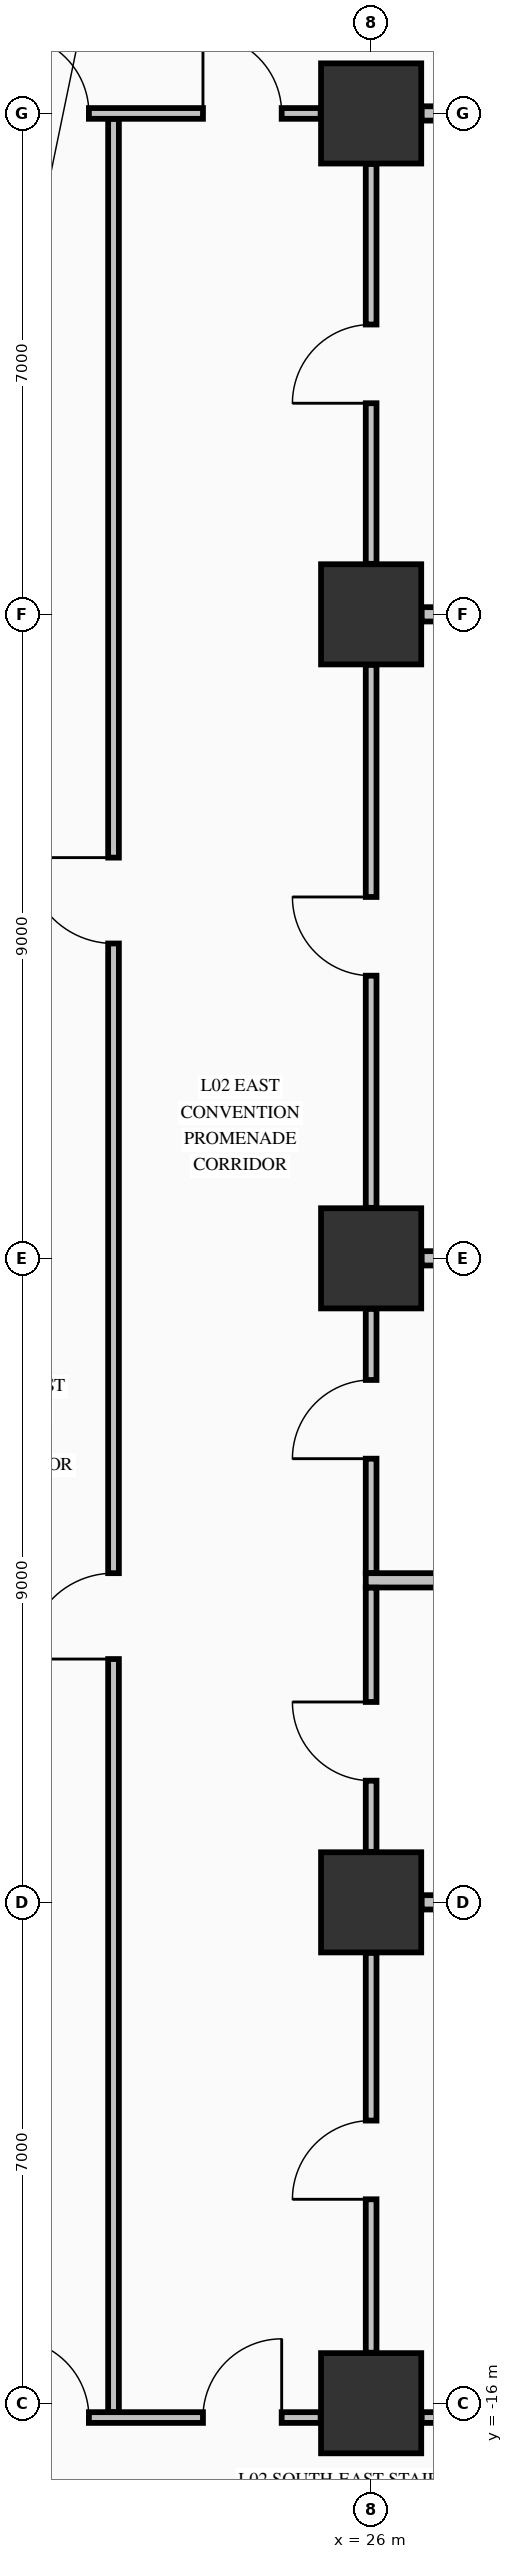
"""IFC4 building model, lengths in metres.
Left out: names, types, materials, properties, quantities, classifications, styles, units other than length and angle.
Written with IfcOpenShell. Run it as: python <this file> out.ifc"""

import sys

from ifc_helpers import new_model, si_unit, direction, frame, frame_2d, origin, origin_2d, place, context, subcontext, project, spatial, rectangle, extrude, element, fill, save


model = new_model("IFC4")
c1 = context("Model", 3, precision=1e-05, world=origin(), true_north=direction((0.0, 1.0)))
c2 = subcontext(c1, "Body", "Model", "MODEL_VIEW")
j1 = project(units=[si_unit("LENGTHUNIT", "METRE"), si_unit("PLANEANGLEUNIT", "RADIAN")], contexts=[c1])
p1 = place(None, origin())
s1 = spatial("IfcSite", under=j1, at=p1, CompositionType="ELEMENT")
p2 = place(p1, origin())
s2 = spatial("IfcBuilding", under=s1, at=p2, CompositionType="ELEMENT")
p3 = place(p2, frame((0.0, 0.0, 10.88)))
s3 = spatial("IfcBuildingStorey", under=s2, at=p3, CompositionType="ELEMENT", Elevation=10.88)
for number, where, z_axis, x_axis in (
    (1, (26.0, -16.0, 0.0), (0.0, 0.0, 1.0), (1.0, 0.0, 0.0)),
    (2, (26.0, -9.0, 0.0), (0.0, 0.0, 1.0), (1.0, 0.0, 0.0)),
    (3, (26.0, 0.0, 0.0), (0.0, 0.0, 1.0), (1.0, 0.0, 0.0)),
    (4, (26.0, 9.0, 0.0), (0.0, 0.0, 1.0), (1.0, 0.0, 0.0)),
    (5, (26.0, 16.0, 0.0), (0.0, 0.0, 1.0), (1.0, 0.0, 0.0)),
):
    element("IfcColumn", number, at=place(p3, frame(where, z_axis=z_axis, x_axis=x_axis)), inside=s3, PredefinedType="COLUMN", context=c2, shape_type="SweptSolid", body=[
        extrude(rectangle(XDim=1.4, YDim=1.4, at=origin_2d()), origin(), (0.0, 0.0, 1.0), 5.09),
    ])
p4 = place(p3, frame((20.806, -16.2, 0.0), z_axis=(0.0, 0.0, 1.0), x_axis=(1.0, 0.0, 0.0)))
e6 = element("IfcWall", 6, at=p4, inside=s3, PredefinedType="PARTITIONING", context=c2, shape_type="SweptSolid", body=[
    extrude(rectangle(XDim=4.488, YDim=0.15, at=frame_2d((2.244, 0.0))), origin(), (0.0, 0.0, 1.0), 4.132),
])
p5 = place(p4, frame((0.15, 0.0, 0.0)))
e7 = element("IfcOpeningElement", 7, at=p5, cuts=e6, PredefinedType="OPENING", context=c2, shape_type="SweptSolid", body=[
    extrude(rectangle(XDim=1.1, YDim=2.15, at=frame_2d((0.55, 1.075))), frame((0.0, 0.085, 0.0), z_axis=(0.0, -1.0, 0.0), x_axis=(1.0, 0.0, 0.0)), (0.0, 0.0, 1.0), 0.17),
])
p6 = place(p4, frame((2.844, 0.0, 0.0)))
e8 = element("IfcOpeningElement", 8, at=p6, cuts=e6, PredefinedType="OPENING", context=c2, shape_type="SweptSolid", body=[
    extrude(rectangle(XDim=1.1, YDim=2.15, at=frame_2d((0.55, 1.075))), frame((0.0, 0.085, 0.0), z_axis=(0.0, -1.0, 0.0), x_axis=(1.0, 0.0, 0.0)), (0.0, 0.0, 1.0), 0.17),
])
p7 = place(p3, frame((26.706, -16.2, 0.0), z_axis=(0.0, 0.0, 1.0), x_axis=(1.0, 0.0, 0.0)))
e9 = element("IfcWall", 9, at=p7, inside=s3, PredefinedType="PARTITIONING", context=c2, shape_type="SweptSolid", body=[
    extrude(rectangle(XDim=2.588, YDim=0.15, at=frame_2d((1.294, 0.0))), origin(), (0.0, 0.0, 1.0), 4.132),
])
p8 = place(p3, frame((26.706, -9.0, 0.0), z_axis=(0.0, 0.0, 1.0), x_axis=(1.0, 0.0, 0.0)))
e10 = element("IfcWall", 10, at=p8, inside=s3, PredefinedType="PARTITIONING", context=c2, shape_type="SweptSolid", body=[
    extrude(rectangle(XDim=2.588, YDim=0.2, at=frame_2d((1.294, 0.0))), origin(), (0.0, 0.0, 1.0), 4.132),
])
p9 = place(p3, frame((25.925, -4.5, 0.0), z_axis=(0.0, 0.0, 1.0), x_axis=(1.0, 0.0, 0.0)))
e11 = element("IfcWall", 11, at=p9, inside=s3, PredefinedType="PARTITIONING", context=c2, shape_type="SweptSolid", body=[
    extrude(rectangle(XDim=7.91, YDim=0.2, at=frame_2d((3.955, 0.0))), origin(), (0.0, 0.0, 1.0), 4.48),
])
for number, where, z_axis, x_axis in (
    (12, (26.706, 0.0, 0.0), (0.0, 0.0, 1.0), (1.0, 0.0, 0.0)),
    (13, (26.706, 9.0, 0.0), (0.0, 0.0, 1.0), (1.0, 0.0, 0.0)),
):
    element("IfcWall", number, at=place(p3, frame(where, z_axis=z_axis, x_axis=x_axis)), inside=s3, PredefinedType="PARTITIONING", context=c2, shape_type="SweptSolid", body=[
        extrude(rectangle(XDim=2.588, YDim=0.2, at=frame_2d((1.294, 0.0))), origin(), (0.0, 0.0, 1.0), 4.132),
    ])
p10 = place(p3, frame((20.806, 16.0, 0.0), z_axis=(0.0, 0.0, 1.0), x_axis=(1.0, 0.0, 0.0)))
e14 = element("IfcWall", 14, at=p10, inside=s3, PredefinedType="PARTITIONING", context=c2, shape_type="SweptSolid", body=[
    extrude(rectangle(XDim=4.488, YDim=0.15, at=frame_2d((2.244, 0.0))), origin(), (0.0, 0.0, 1.0), 4.132),
])
p11 = place(p10, frame((0.15, 0.0, 0.0)))
e15 = element("IfcOpeningElement", 15, at=p11, cuts=e14, PredefinedType="OPENING", context=c2, shape_type="SweptSolid", body=[
    extrude(rectangle(XDim=1.1, YDim=2.15, at=frame_2d((0.55, 1.075))), frame((0.0, 0.085, 0.0), z_axis=(0.0, -1.0, 0.0), x_axis=(1.0, 0.0, 0.0)), (0.0, 0.0, 1.0), 0.17),
])
p12 = place(p10, frame((2.844, 0.0, 0.0)))
e16 = element("IfcOpeningElement", 16, at=p12, cuts=e14, PredefinedType="OPENING", context=c2, shape_type="SweptSolid", body=[
    extrude(rectangle(XDim=1.1, YDim=2.15, at=frame_2d((0.55, 1.075))), frame((0.0, 0.085, 0.0), z_axis=(0.0, -1.0, 0.0), x_axis=(1.0, 0.0, 0.0)), (0.0, 0.0, 1.0), 0.17),
])
p13 = place(p3, frame((26.706, 16.0, 0.0), z_axis=(0.0, 0.0, 1.0), x_axis=(1.0, 0.0, 0.0)))
e17 = element("IfcWall", 17, at=p13, inside=s3, PredefinedType="PARTITIONING", context=c2, shape_type="SweptSolid", body=[
    extrude(rectangle(XDim=2.588, YDim=0.2, at=frame_2d((1.294, 0.0))), origin(), (0.0, 0.0, 1.0), 4.132),
])
p14 = place(p3, frame((22.4, -16.122, 0.0), z_axis=(0.0, 0.0, 1.0), x_axis=(0.0, 1.0, 0.0)))
e18 = element("IfcWall", 18, at=p14, inside=s3, PredefinedType="PARTITIONING", context=c2, shape_type="SweptSolid", body=[
    extrude(rectangle(XDim=32.044, YDim=0.15, at=frame_2d((16.022, 0.0))), origin(), (0.0, 0.0, 1.0), 5.09),
])
p15 = place(p14, frame((10.522, 0.0, 0.0)))
e19 = element("IfcOpeningElement", 19, at=p15, cuts=e18, PredefinedType="OPENING", context=c2, shape_type="SweptSolid", body=[
    extrude(rectangle(XDim=1.2, YDim=2.15, at=frame_2d((0.6, 1.075))), frame((0.0, 0.085, 0.0), z_axis=(0.0, -1.0, 0.0), x_axis=(1.0, 0.0, 0.0)), (0.0, 0.0, 1.0), 0.17),
])
p16 = place(p14, frame((20.522, 0.0, 0.0)))
e20 = element("IfcOpeningElement", 20, at=p16, cuts=e18, PredefinedType="OPENING", context=c2, shape_type="SweptSolid", body=[
    extrude(rectangle(XDim=1.2, YDim=2.15, at=frame_2d((0.6, 1.075))), frame((0.0, 0.085, 0.0), z_axis=(0.0, -1.0, 0.0), x_axis=(1.0, 0.0, 0.0)), (0.0, 0.0, 1.0), 0.17),
])
p17 = place(p3, frame((26.0, -15.294, 0.0), z_axis=(0.0, 0.0, 1.0), x_axis=(0.0, 1.0, 0.0)))
e21 = element("IfcWall", 21, at=p17, inside=s3, PredefinedType="PARTITIONING", context=c2, shape_type="SweptSolid", body=[
    extrude(rectangle(XDim=5.588, YDim=0.15, at=frame_2d((2.794, 0.0))), origin(), (0.0, 0.0, 1.0), 4.132),
])
p18 = place(p17, frame((2.144, 0.0, 0.0)))
e22 = element("IfcOpeningElement", 22, at=p18, cuts=e21, PredefinedType="OPENING", context=c2, shape_type="SweptSolid", body=[
    extrude(rectangle(XDim=1.1, YDim=2.15, at=frame_2d((0.55, 1.075))), frame((0.0, 0.085, 0.0), z_axis=(0.0, -1.0, 0.0), x_axis=(1.0, 0.0, 0.0)), (0.0, 0.0, 1.0), 0.17),
])
p19 = place(p3, frame((26.0, -8.294, 0.0), z_axis=(0.0, 0.0, 1.0), x_axis=(0.0, 1.0, 0.0)))
e23 = element("IfcWall", 23, at=p19, inside=s3, PredefinedType="PARTITIONING", context=c2, shape_type="SweptSolid", body=[
    extrude(rectangle(XDim=3.691, YDim=0.15, at=frame_2d((1.845, 0.0))), origin(), (0.0, 0.0, 1.0), 4.132),
])
p20 = place(p19, frame((0.994, 0.0, 0.0)))
e24 = element("IfcOpeningElement", 24, at=p20, cuts=e23, PredefinedType="OPENING", context=c2, shape_type="SweptSolid", body=[
    extrude(rectangle(XDim=1.1, YDim=2.15, at=frame_2d((0.55, 1.075))), frame((0.0, 0.085, 0.0), z_axis=(0.0, -1.0, 0.0), x_axis=(1.0, 0.0, 0.0)), (0.0, 0.0, 1.0), 0.17),
])
p21 = place(p3, frame((26.0, -4.397, 0.0), z_axis=(0.0, 0.0, 1.0), x_axis=(0.0, 1.0, 0.0)))
e25 = element("IfcWall", 25, at=p21, inside=s3, PredefinedType="PARTITIONING", context=c2, shape_type="SweptSolid", body=[
    extrude(rectangle(XDim=3.691, YDim=0.15, at=frame_2d((1.845, 0.0))), origin(), (0.0, 0.0, 1.0), 4.132),
])
p22 = place(p21, frame((1.597, 0.0, 0.0)))
e26 = element("IfcOpeningElement", 26, at=p22, cuts=e25, PredefinedType="OPENING", context=c2, shape_type="SweptSolid", body=[
    extrude(rectangle(XDim=1.1, YDim=2.15, at=frame_2d((0.55, 1.075))), frame((0.0, 0.085, 0.0), z_axis=(0.0, -1.0, 0.0), x_axis=(1.0, 0.0, 0.0)), (0.0, 0.0, 1.0), 0.17),
])
p23 = place(p3, frame((26.0, 0.706, 0.0), z_axis=(0.0, 0.0, 1.0), x_axis=(0.0, 1.0, 0.0)))
e27 = element("IfcWall", 27, at=p23, inside=s3, PredefinedType="PARTITIONING", context=c2, shape_type="SweptSolid", body=[
    extrude(rectangle(XDim=7.588, YDim=0.15, at=frame_2d((3.794, 0.0))), origin(), (0.0, 0.0, 1.0), 4.132),
])
p24 = place(p23, frame((3.244, 0.0, 0.0)))
e28 = element("IfcOpeningElement", 28, at=p24, cuts=e27, PredefinedType="OPENING", context=c2, shape_type="SweptSolid", body=[
    extrude(rectangle(XDim=1.1, YDim=2.15, at=frame_2d((0.55, 1.075))), frame((0.0, 0.085, 0.0), z_axis=(0.0, -1.0, 0.0), x_axis=(1.0, 0.0, 0.0)), (0.0, 0.0, 1.0), 0.17),
])
p25 = place(p3, frame((26.0, 9.706, 0.0), z_axis=(0.0, 0.0, 1.0), x_axis=(0.0, 1.0, 0.0)))
e29 = element("IfcWall", 29, at=p25, inside=s3, PredefinedType="PARTITIONING", context=c2, shape_type="SweptSolid", body=[
    extrude(rectangle(XDim=5.588, YDim=0.15, at=frame_2d((2.794, 0.0))), origin(), (0.0, 0.0, 1.0), 4.132),
])
p26 = place(p25, frame((2.244, 0.0, 0.0)))
e30 = element("IfcOpeningElement", 30, at=p26, cuts=e29, PredefinedType="OPENING", context=c2, shape_type="SweptSolid", body=[
    extrude(rectangle(XDim=1.1, YDim=2.15, at=frame_2d((0.55, 1.075))), frame((0.0, 0.085, 0.0), z_axis=(0.0, -1.0, 0.0), x_axis=(1.0, 0.0, 0.0)), (0.0, 0.0, 1.0), 0.17),
])
p27 = place(p11, origin())
e31 = element("IfcDoor", 31, at=p27, inside=s3, OperationType="SINGLE_SWING_LEFT", PredefinedType="DOOR", context=c2, shape_type="SweptSolid", body=[
    extrude(rectangle(XDim=1.1, YDim=2.15, at=frame_2d((0.55, 1.075))), frame((0.0, 0.025, 0.0), z_axis=(0.0, -1.0, 0.0), x_axis=(1.0, 0.0, 0.0)), (0.0, 0.0, 1.0), 0.05),
])
fill(e15, e31)
p28 = place(p5, origin())
e32 = element("IfcDoor", 32, at=p28, inside=s3, OperationType="SINGLE_SWING_LEFT", PredefinedType="DOOR", context=c2, shape_type="SweptSolid", body=[
    extrude(rectangle(XDim=1.1, YDim=2.15, at=frame_2d((0.55, 1.075))), frame((0.0, 0.025, 0.0), z_axis=(0.0, -1.0, 0.0), x_axis=(1.0, 0.0, 0.0)), (0.0, 0.0, 1.0), 0.05),
])
fill(e7, e32)
p29 = place(p15, origin())
e33 = element("IfcDoor", 33, at=p29, inside=s3, OperationType="SINGLE_SWING_LEFT", PredefinedType="DOOR", context=c2, shape_type="SweptSolid", body=[
    extrude(rectangle(XDim=1.2, YDim=2.15, at=frame_2d((0.6, 1.075))), frame((0.0, 0.025, 0.0), z_axis=(0.0, -1.0, 0.0), x_axis=(1.0, 0.0, 0.0)), (0.0, 0.0, 1.0), 0.05),
])
fill(e19, e33)
p30 = place(p16, origin())
e34 = element("IfcDoor", 34, at=p30, inside=s3, OperationType="SINGLE_SWING_RIGHT", PredefinedType="DOOR", context=c2, shape_type="SweptSolid", body=[
    extrude(rectangle(XDim=1.2, YDim=2.15, at=frame_2d((0.6, 1.075))), frame((0.0, 0.025, 0.0), z_axis=(0.0, -1.0, 0.0), x_axis=(1.0, 0.0, 0.0)), (0.0, 0.0, 1.0), 0.05),
])
fill(e20, e34)
p31 = place(p12, origin())
e35 = element("IfcDoor", 35, at=p31, inside=s3, OperationType="SINGLE_SWING_LEFT", PredefinedType="DOOR", context=c2, shape_type="SweptSolid", body=[
    extrude(rectangle(XDim=1.1, YDim=2.15, at=frame_2d((0.55, 1.075))), frame((0.0, 0.025, 0.0), z_axis=(0.0, -1.0, 0.0), x_axis=(1.0, 0.0, 0.0)), (0.0, 0.0, 1.0), 0.05),
])
fill(e16, e35)
p32 = place(p6, origin())
e36 = element("IfcDoor", 36, at=p32, inside=s3, OperationType="SINGLE_SWING_RIGHT", PredefinedType="DOOR", context=c2, shape_type="SweptSolid", body=[
    extrude(rectangle(XDim=1.1, YDim=2.15, at=frame_2d((0.55, 1.075))), frame((0.0, 0.025, 0.0), z_axis=(0.0, -1.0, 0.0), x_axis=(1.0, 0.0, 0.0)), (0.0, 0.0, 1.0), 0.05),
])
fill(e8, e36)
p33 = place(p18, origin())
e37 = element("IfcDoor", 37, at=p33, inside=s3, OperationType="SINGLE_SWING_LEFT", PredefinedType="DOOR", context=c2, shape_type="SweptSolid", body=[
    extrude(rectangle(XDim=1.1, YDim=2.15, at=frame_2d((0.55, 1.075))), frame((0.0, 0.025, 0.0), z_axis=(0.0, -1.0, 0.0), x_axis=(1.0, 0.0, 0.0)), (0.0, 0.0, 1.0), 0.05),
])
fill(e22, e37)
p34 = place(p20, origin())
e38 = element("IfcDoor", 38, at=p34, inside=s3, OperationType="SINGLE_SWING_RIGHT", PredefinedType="DOOR", context=c2, shape_type="SweptSolid", body=[
    extrude(rectangle(XDim=1.1, YDim=2.15, at=frame_2d((0.55, 1.075))), frame((0.0, 0.025, 0.0), z_axis=(0.0, -1.0, 0.0), x_axis=(1.0, 0.0, 0.0)), (0.0, 0.0, 1.0), 0.05),
])
fill(e24, e38)
p35 = place(p22, origin())
e39 = element("IfcDoor", 39, at=p35, inside=s3, OperationType="SINGLE_SWING_LEFT", PredefinedType="DOOR", context=c2, shape_type="SweptSolid", body=[
    extrude(rectangle(XDim=1.1, YDim=2.15, at=frame_2d((0.55, 1.075))), frame((0.0, 0.025, 0.0), z_axis=(0.0, -1.0, 0.0), x_axis=(1.0, 0.0, 0.0)), (0.0, 0.0, 1.0), 0.05),
])
fill(e26, e39)
p36 = place(p24, origin())
e40 = element("IfcDoor", 40, at=p36, inside=s3, OperationType="SINGLE_SWING_RIGHT", PredefinedType="DOOR", context=c2, shape_type="SweptSolid", body=[
    extrude(rectangle(XDim=1.1, YDim=2.15, at=frame_2d((0.55, 1.075))), frame((0.0, 0.025, 0.0), z_axis=(0.0, -1.0, 0.0), x_axis=(1.0, 0.0, 0.0)), (0.0, 0.0, 1.0), 0.05),
])
fill(e28, e40)
p37 = place(p26, origin())
e41 = element("IfcDoor", 41, at=p37, inside=s3, OperationType="SINGLE_SWING_LEFT", PredefinedType="DOOR", context=c2, shape_type="SweptSolid", body=[
    extrude(rectangle(XDim=1.1, YDim=2.15, at=frame_2d((0.55, 1.075))), frame((0.0, 0.025, 0.0), z_axis=(0.0, -1.0, 0.0), x_axis=(1.0, 0.0, 0.0)), (0.0, 0.0, 1.0), 0.05),
])
fill(e30, e41)
save(model, sys.argv[1])
